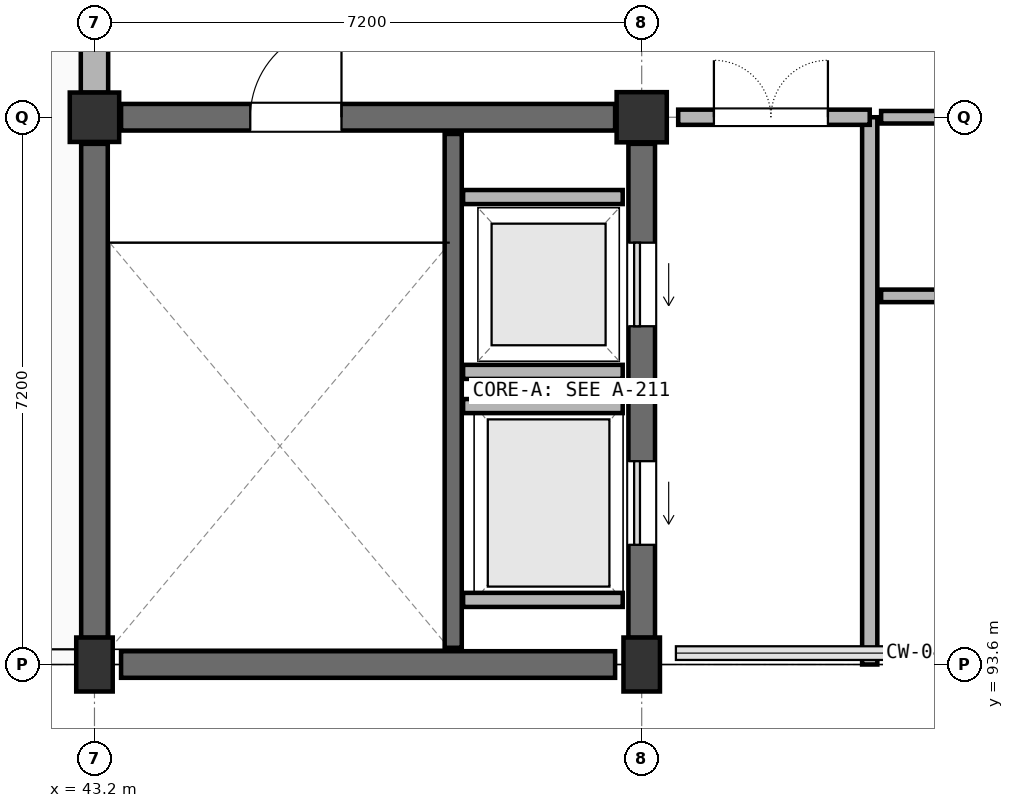
"""IFC4 building model, lengths in metres.
Left out: names, types, materials, properties, quantities, classifications, styles, units other than length and angle.
Written with IfcOpenShell. Run it as: python <this file> out.ifc"""

import sys

from ifc_helpers import new_model, si_unit, direction, frame, frame_2d, origin, origin_2d, place, context, subcontext, project, spatial, rectangle, extrude, element, fill, save


model = new_model("IFC4")
c1 = context("Model", 3, precision=1e-05, world=origin(), true_north=direction((0.0, 1.0)))
c2 = subcontext(c1, "Body", "Model", "MODEL_VIEW")
j1 = project(units=[si_unit("LENGTHUNIT", "METRE"), si_unit("PLANEANGLEUNIT", "RADIAN")], contexts=[c1])
p1 = place(None, origin())
s1 = spatial("IfcSite", under=j1, at=p1, CompositionType="ELEMENT")
p2 = place(p1, origin())
s2 = spatial("IfcBuilding", under=s1, at=p2, CompositionType="ELEMENT")
p3 = place(p2, frame((0.0, 0.0, 30.3)))
s3 = spatial("IfcBuildingStorey", under=s2, at=p3, CompositionType="ELEMENT", Elevation=30.3)
p4 = place(p3, frame((43.2, 93.6, 0.0), z_axis=(0.0, 0.0, 1.0), x_axis=(1.0, 0.0, 0.0)))
e1 = element("IfcColumn", 1, at=p4, inside=s3, PredefinedType="COLUMN", context=c2, shape_type="SweptSolid", body=[
    extrude(rectangle(XDim=0.48, YDim=0.71, at=origin_2d()), origin(), (0.0, 0.0, 1.0), 3.9),
])
p5 = place(p3, frame((43.2, 100.8, 0.0), z_axis=(0.0, 0.0, 1.0), x_axis=(1.0, 0.0, 0.0)))
e2 = element("IfcColumn", 2, at=p5, inside=s3, PredefinedType="COLUMN", context=c2, shape_type="SweptSolid", body=[
    extrude(rectangle(XDim=0.65, YDim=0.65, at=origin_2d()), origin(), (0.0, 0.0, 1.0), 3.9),
])
p6 = place(p3, frame((50.4, 93.6, 0.0), z_axis=(0.0, 0.0, 1.0), x_axis=(1.0, 0.0, 0.0)))
e3 = element("IfcColumn", 3, at=p6, inside=s3, PredefinedType="COLUMN", context=c2, shape_type="SweptSolid", body=[
    extrude(rectangle(XDim=0.48, YDim=0.71, at=origin_2d()), origin(), (0.0, 0.0, 1.0), 3.9),
])
p7 = place(p3, frame((50.4, 100.8, 0.0), z_axis=(0.0, 0.0, 1.0), x_axis=(1.0, 0.0, 0.0)))
e4 = element("IfcColumn", 4, at=p7, inside=s3, PredefinedType="COLUMN", context=c2, shape_type="SweptSolid", body=[
    extrude(rectangle(XDim=0.66, YDim=0.66, at=origin_2d()), origin(), (0.0, 0.0, 1.0), 3.9),
])
p8 = place(p3, frame((43.55, 93.6, 0.0), z_axis=(0.0, 0.0, 1.0), x_axis=(1.0, 0.0, 0.0)))
e5 = element("IfcWall", 5, at=p8, inside=s3, PredefinedType="SHEAR", context=c2, shape_type="SweptSolid", body=[
    extrude(rectangle(XDim=6.5, YDim=0.35, at=frame_2d((3.25, 0.0))), origin(), (0.0, 0.0, 1.0), 3.9),
])
p9 = place(p3, frame((50.4, 93.95, 0.0), z_axis=(0.0, 0.0, 1.0), x_axis=(0.0, 1.0, 0.0)))
e6 = element("IfcWall", 6, at=p9, inside=s3, PredefinedType="SHEAR", context=c2, shape_type="SweptSolid", body=[
    extrude(rectangle(XDim=6.5, YDim=0.35, at=frame_2d((3.25, 0.0))), origin(), (0.0, 0.0, 1.0), 3.9),
])
p10 = place(p9, frame((1.225, 0.0, 0.0)))
e7 = element("IfcOpeningElement", 7, at=p10, cuts=e6, PredefinedType="OPENING", context=c2, shape_type="SweptSolid", body=[
    extrude(rectangle(XDim=1.1, YDim=2.2, at=frame_2d((0.55, 1.1))), frame((0.0, 0.185, 0.0), z_axis=(0.0, -1.0, 0.0), x_axis=(1.0, 0.0, 0.0)), (0.0, 0.0, 1.0), 0.37),
])
p11 = place(p9, frame((4.1, 0.0, 0.0)))
e8 = element("IfcOpeningElement", 8, at=p11, cuts=e6, PredefinedType="OPENING", context=c2, shape_type="SweptSolid", body=[
    extrude(rectangle(XDim=1.1, YDim=2.2, at=frame_2d((0.55, 1.1))), frame((0.0, 0.185, 0.0), z_axis=(0.0, -1.0, 0.0), x_axis=(1.0, 0.0, 0.0)), (0.0, 0.0, 1.0), 0.37),
])
p12 = place(p3, frame((50.05, 100.8, 0.0), z_axis=(0.0, 0.0, 1.0), x_axis=(-1.0, 0.0, 0.0)))
e9 = element("IfcWall", 9, at=p12, inside=s3, PredefinedType="SHEAR", context=c2, shape_type="SweptSolid", body=[
    extrude(rectangle(XDim=6.5, YDim=0.35, at=frame_2d((3.25, 0.0))), origin(), (0.0, 0.0, 1.0), 3.9),
])
p13 = place(p12, frame((3.6, 0.0, 0.0)))
e10 = element("IfcOpeningElement", 10, at=p13, cuts=e9, PredefinedType="OPENING", context=c2, shape_type="SweptSolid", body=[
    extrude(rectangle(XDim=1.2, YDim=2.2, at=frame_2d((0.6, 1.1))), frame((0.0, 0.185, 0.0), z_axis=(0.0, -1.0, 0.0), x_axis=(1.0, 0.0, 0.0)), (0.0, 0.0, 1.0), 0.37),
])
p14 = place(p3, frame((43.2, 100.45, 0.0), z_axis=(0.0, 0.0, 1.0), x_axis=(0.0, -1.0, 0.0)))
e11 = element("IfcWall", 11, at=p14, inside=s3, PredefinedType="SHEAR", context=c2, shape_type="SweptSolid", body=[
    extrude(rectangle(XDim=6.5, YDim=0.35, at=frame_2d((3.25, 0.0))), origin(), (0.0, 0.0, 1.0), 3.9),
])
p15 = place(p3, frame((47.92, 93.82, 0.0), z_axis=(0.0, 0.0, 1.0), x_axis=(0.0, 1.0, 0.0)))
e12 = element("IfcWall", 12, at=p15, inside=s3, PredefinedType="SHEAR", context=c2, shape_type="SweptSolid", body=[
    extrude(rectangle(XDim=6.76, YDim=0.225, at=frame_2d((3.38, 0.0))), origin(), (0.0, 0.0, 1.0), 3.9),
])
for number, where, z_axis, x_axis in (
    (13, (48.05, 94.45, 0.0), (0.0, 0.0, 1.0), (1.0, 0.0, 0.0)),
    (14, (48.05, 97.0, 0.0), (0.0, 0.0, 1.0), (1.0, 0.0, 0.0)),
    (15, (48.05, 97.45, 0.0), (0.0, 0.0, 1.0), (1.0, 0.0, 0.0)),
    (16, (48.05, 99.75, 0.0), (0.0, 0.0, 1.0), (1.0, 0.0, 0.0)),
):
    element("IfcWall", number, at=place(p3, frame(where, z_axis=z_axis, x_axis=x_axis)), inside=s3, PredefinedType="PARTITIONING", context=c2, shape_type="SweptSolid", body=[
        extrude(rectangle(XDim=2.1, YDim=0.185, at=frame_2d((1.05, 0.0))), origin(), (0.0, 0.0, 1.0), 3.9),
    ])
p16 = place(p3, frame((43.2, 101.123, 0.0), z_axis=(0.0, 0.0, 1.0), x_axis=(0.0, 1.0, 0.0)))
e17 = element("IfcWall", 17, at=p16, inside=s3, PredefinedType="SOLIDWALL", context=c2, shape_type="SweptSolid", body=[
    extrude(rectangle(XDim=6.554, YDim=0.36, at=frame_2d((3.277, 0.0))), origin(), (0.0, 0.0, 1.0), 2.74),
])
p17 = place(p3, frame((53.4, 93.6, 0.0), z_axis=(0.0, 0.0, 1.0), x_axis=(0.0, 1.0, 0.0)))
e18 = element("IfcWall", 18, at=p17, inside=s3, PredefinedType="PARTITIONING", context=c2, shape_type="SweptSolid", body=[
    extrude(rectangle(XDim=7.2, YDim=0.2, at=frame_2d((3.6, 0.0))), origin(), (0.0, 0.0, 1.0), 2.78),
])
p18 = place(p3, frame((53.4, 100.8, 0.0), z_axis=(0.0, 0.0, 1.0), x_axis=(-1.0, 0.0, 0.0)))
e19 = element("IfcWall", 19, at=p18, inside=s3, PredefinedType="PARTITIONING", context=c2, shape_type="SweptSolid", body=[
    extrude(rectangle(XDim=2.52, YDim=0.2, at=frame_2d((1.26, 0.0))), origin(), (0.0, 0.0, 1.0), 2.78),
])
p19 = place(p18, frame((0.55, 0.0, 0.0)))
e20 = element("IfcOpeningElement", 20, at=p19, cuts=e19, PredefinedType="OPENING", context=c2, shape_type="SweptSolid", body=[
    extrude(rectangle(XDim=1.5, YDim=2.2, at=frame_2d((0.75, 1.1))), frame((0.0, 0.11, 0.0), z_axis=(0.0, -1.0, 0.0), x_axis=(1.0, 0.0, 0.0)), (0.0, 0.0, 1.0), 0.22),
])
p20 = place(p3, frame((56.75, 100.8, 0.0), z_axis=(0.0, 0.0, 1.0), x_axis=(-1.0, 0.0, 0.0)))
e21 = element("IfcWall", 21, at=p20, inside=s3, PredefinedType="PARTITIONING", context=c2, shape_type="SweptSolid", body=[
    extrude(rectangle(XDim=3.2, YDim=0.165, at=frame_2d((1.6, 0.0))), origin(), (0.0, 0.0, 1.0), 2.78),
])
p21 = place(p20, frame((0.95, 0.0, 0.0)))
e22 = element("IfcOpeningElement", 22, at=p21, cuts=e21, PredefinedType="OPENING", context=c2, shape_type="SweptSolid", body=[
    extrude(rectangle(XDim=0.95, YDim=2.15, at=frame_2d((0.475, 1.075))), frame((0.0, 0.093, 0.0), z_axis=(0.0, -1.0, 0.0), x_axis=(1.0, 0.0, 0.0)), (0.0, 0.0, 1.0), 0.185),
])
p22 = place(p3, frame((53.55, 98.45, 0.0), z_axis=(0.0, 0.0, 1.0), x_axis=(1.0, 0.0, 0.0)))
e23 = element("IfcWall", 23, at=p22, inside=s3, PredefinedType="PARTITIONING", context=c2, shape_type="SweptSolid", body=[
    extrude(rectangle(XDim=3.2, YDim=0.165, at=frame_2d((1.6, 0.0))), origin(), (0.0, 0.0, 1.0), 2.78),
])
p23 = place(p10, origin())
e24 = element("IfcDoor", 24, at=p23, inside=s3, OperationType="SLIDING_TO_LEFT", PredefinedType="DOOR", context=c2, shape_type="SweptSolid", body=[
    extrude(rectangle(XDim=1.1, YDim=2.2, at=frame_2d((0.55, 1.1))), frame((0.0, 0.025, 0.0), z_axis=(0.0, -1.0, 0.0), x_axis=(1.0, 0.0, 0.0)), (0.0, 0.0, 1.0), 0.05),
])
fill(e7, e24)
p24 = place(p11, origin())
e25 = element("IfcDoor", 25, at=p24, inside=s3, OperationType="SLIDING_TO_LEFT", PredefinedType="DOOR", context=c2, shape_type="SweptSolid", body=[
    extrude(rectangle(XDim=1.1, YDim=2.2, at=frame_2d((0.55, 1.1))), frame((0.0, 0.025, 0.0), z_axis=(0.0, -1.0, 0.0), x_axis=(1.0, 0.0, 0.0)), (0.0, 0.0, 1.0), 0.05),
])
fill(e8, e25)
p25 = place(p13, frame((1.2, 0.0, 0.0), z_axis=(0.0, 0.0, 1.0), x_axis=(-1.0, 0.0, 0.0)))
e26 = element("IfcDoor", 26, at=p25, inside=s3, OperationType="SINGLE_SWING_RIGHT", PredefinedType="DOOR", context=c2, shape_type="SweptSolid", body=[
    extrude(rectangle(XDim=1.2, YDim=2.2, at=frame_2d((0.6, 1.1))), frame((0.0, 0.025, 0.0), z_axis=(0.0, -1.0, 0.0), x_axis=(1.0, 0.0, 0.0)), (0.0, 0.0, 1.0), 0.05),
])
fill(e10, e26)
p26 = place(p19, frame((1.5, 0.0, 0.0), z_axis=(0.0, 0.0, 1.0), x_axis=(-1.0, 0.0, 0.0)))
e27 = element("IfcDoor", 27, at=p26, inside=s3, OperationType="DOUBLE_DOOR_SINGLE_SWING", PredefinedType="DOOR", context=c2, shape_type="SweptSolid", body=[
    extrude(rectangle(XDim=1.5, YDim=2.2, at=frame_2d((0.75, 1.1))), frame((0.0, 0.025, 0.0), z_axis=(0.0, -1.0, 0.0), x_axis=(1.0, 0.0, 0.0)), (0.0, 0.0, 1.0), 0.05),
])
fill(e20, e27)
save(model, sys.argv[1])
